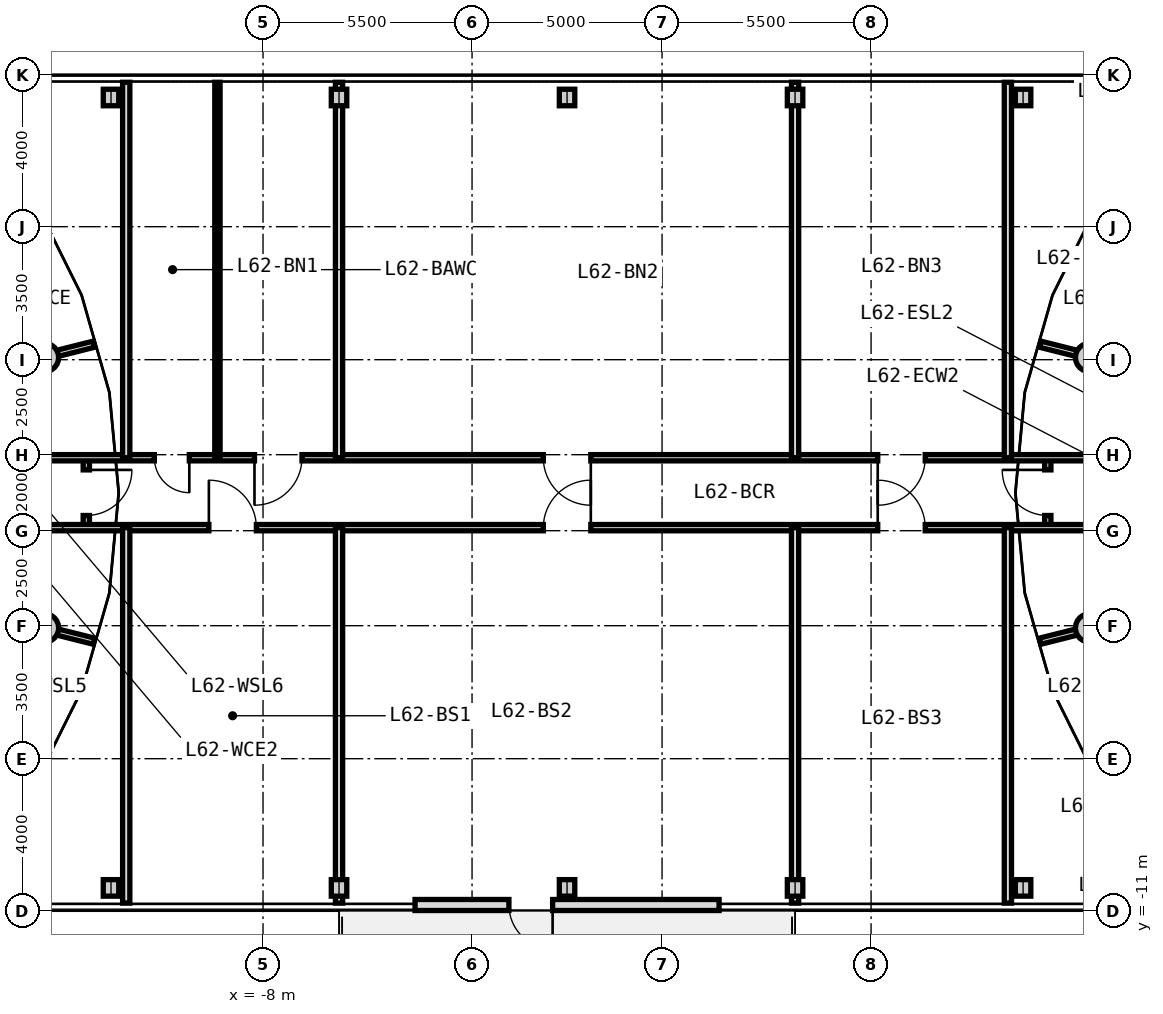
"""IFC4 building model, lengths in metres.
Left out: names, types, materials, properties, quantities, classifications, styles, units other than length and angle.
Written with IfcOpenShell. Run it as: python <this file> out.ifc"""

import sys

from ifc_helpers import new_model, si_unit, direction, frame, frame_2d, origin, origin_2d, place, context, subcontext, project, spatial, rectangle, circle, i_section, extrude, source, transform, mapped, element, fill, save


model = new_model("IFC4")
c1 = context("Model", 3, precision=1e-05, world=origin(), true_north=direction((0.0, 1.0)))
c2 = subcontext(c1, "Body", "Model", "MODEL_VIEW")
j1 = project(units=[si_unit("LENGTHUNIT", "METRE"), si_unit("PLANEANGLEUNIT", "RADIAN")], contexts=[c1])
p1 = place(None, origin())
s1 = spatial("IfcSite", under=j1, at=p1, CompositionType="ELEMENT")
p2 = place(p1, origin())
s2 = spatial("IfcBuilding", under=s1, at=p2, CompositionType="ELEMENT")
p3 = place(p2, frame((0.0, 0.0, 199.8)))
s3 = spatial("IfcBuildingStorey", under=s2, at=p3, CompositionType="ELEMENT", Elevation=199.8)
m1 = source(origin(), c2, "Body", "SweptSolid", [
    extrude(circle(Radius=0.375, at=origin_2d()), origin(), (0.0, 0.0, 1.0), 4.0),
])
for number, where, z_axis, x_axis in (
    (1, (-13.753, 3.559, 0.0), (0.0, 0.0, 1.0), (1.0, 0.0, 0.0)),
    (2, (-13.753, -3.559, 0.0), (0.0, 0.0, 1.0), (1.0, 0.0, 0.0)),
    (3, (13.753, 3.559, 0.0), (0.0, 0.0, 1.0), (1.0, 0.0, 0.0)),
    (4, (13.753, -3.559, 0.0), (0.0, 0.0, 1.0), (1.0, 0.0, 0.0)),
):
    element("IfcColumn", number, at=place(p3, frame(where, z_axis=z_axis, x_axis=x_axis)), inside=s3, PredefinedType="COLUMN", context=c2, shape_type="MappedRepresentation", body=[
        mapped(m1, transform((0.0, 0.0, 0.0), x_axis=(1.0, 0.0, 0.0), y_axis=(0.0, 1.0, 0.0), z_axis=(0.0, 0.0, 1.0), scale=1.0)),
    ])
m2 = source(origin(), c2, "Body", "SweptSolid", [
    extrude(i_section(OverallWidth=0.407, OverallDepth=0.435, WebThickness=0.024, FlangeThickness=0.039, FilletRadius=0.015, at=origin_2d()), origin(), (0.0, 0.0, 1.0), 4.42),
])
for number, where, z_axis, x_axis in (
    (5, (-12.0, -10.4, -0.42), (0.0, 0.0, 1.0), (1.0, 0.0, 0.0)),
    (6, (-12.0, 10.4, -0.42), (0.0, 0.0, 1.0), (1.0, 0.0, 0.0)),
    (7, (-6.0, -10.4, -0.42), (0.0, 0.0, 1.0), (1.0, 0.0, 0.0)),
    (8, (-6.0, 10.4, -0.42), (0.0, 0.0, 1.0), (1.0, 0.0, 0.0)),
    (9, (0.0, -10.4, -0.42), (0.0, 0.0, 1.0), (1.0, 0.0, 0.0)),
    (10, (0.0, 10.4, -0.42), (0.0, 0.0, 1.0), (1.0, 0.0, 0.0)),
    (11, (6.0, -10.4, -0.42), (0.0, 0.0, 1.0), (1.0, 0.0, 0.0)),
    (12, (6.0, 10.4, -0.42), (0.0, 0.0, 1.0), (1.0, 0.0, 0.0)),
    (13, (12.0, -10.4, -0.42), (0.0, 0.0, 1.0), (1.0, 0.0, 0.0)),
    (14, (12.0, 10.4, -0.42), (0.0, 0.0, 1.0), (1.0, 0.0, 0.0)),
):
    element("IfcColumn", number, at=place(p3, frame(where, z_axis=z_axis, x_axis=x_axis)), inside=s3, PredefinedType="COLUMN", context=c2, shape_type="MappedRepresentation", body=[
        mapped(m2, transform((0.0, 0.0, 0.0), x_axis=(1.0, 0.0, 0.0), y_axis=(0.0, 1.0, 0.0), z_axis=(0.0, 0.0, 1.0), scale=1.0)),
    ])
m3 = source(origin(), c2, "Body", "SweptSolid", [
    extrude(rectangle(XDim=8.0, YDim=0.29, at=frame_2d((4.0, 0.0))), origin(), (0.0, 0.0, 1.0), 3.71),
])
p4 = place(p3, frame((4.0, -10.85, 0.0), z_axis=(0.0, 0.0, 1.0), x_axis=(-1.0, 0.0, 0.0)))
e15 = element("IfcWall", 15, at=p4, inside=s3, PredefinedType="SOLIDWALL", context=c2, shape_type="MappedRepresentation", body=[
    mapped(m3, transform((0.0, 0.0, 0.0), x_axis=(1.0, 0.0, 0.0), y_axis=(0.0, 1.0, 0.0), z_axis=(0.0, 0.0, 1.0), scale=1.0)),
])
p5 = place(p4, frame((4.38, 0.0, 0.0)))
e16 = element("IfcOpeningElement", 16, at=p5, cuts=e15, PredefinedType="OPENING", context=c2, shape_type="SweptSolid", body=[
    extrude(rectangle(XDim=1.15, YDim=2.25, at=frame_2d((0.575, 1.125))), frame((0.0, 0.155, 0.0), z_axis=(0.0, -1.0, 0.0), x_axis=(1.0, 0.0, 0.0)), (0.0, 0.0, 1.0), 0.31),
])
m4 = source(origin(), c2, "Body", "SweptSolid", [
    extrude(rectangle(XDim=6.157, YDim=0.165, at=frame_2d((3.079, 0.0))), origin(), (0.0, 0.0, 1.0), 3.295),
])
for number, where, z_axis, x_axis in (
    (17, (-18.42, -2.407, 0.0), (0.0, 0.0, 1.0), (0.97, -0.244, 0.0)),
    (18, (-18.42, 2.407, 0.0), (0.0, 0.0, 1.0), (0.97, 0.244, 0.0)),
    (19, (18.42, 2.407, 0.0), (0.0, 0.0, 1.0), (-0.97, 0.244, 0.0)),
    (20, (18.42, -2.407, 0.0), (0.0, 0.0, 1.0), (-0.97, -0.244, 0.0)),
):
    element("IfcWall", number, at=place(p3, frame(where, z_axis=z_axis, x_axis=x_axis)), inside=s3, PredefinedType="PARTITIONING", context=c2, shape_type="MappedRepresentation", body=[
        mapped(m4, transform((0.0, 0.0, 0.0), x_axis=(1.0, 0.0, 0.0), y_axis=(0.0, 1.0, 0.0), z_axis=(0.0, 0.0, 1.0), scale=1.0)),
    ])
m5 = source(origin(), c2, "Body", "SweptSolid", [
    extrude(rectangle(XDim=1.84, YDim=0.165, at=frame_2d((0.92, 0.0))), origin(), (0.0, 0.0, 1.0), 3.695),
])
p6 = place(p3, frame((-12.65, -0.92, 0.0), z_axis=(0.0, 0.0, 1.0), x_axis=(0.0, 1.0, 0.0)))
e21 = element("IfcWall", 21, at=p6, inside=s3, PredefinedType="PARTITIONING", context=c2, shape_type="MappedRepresentation", body=[
    mapped(m5, transform((0.0, 0.0, 0.0), x_axis=(1.0, 0.0, 0.0), y_axis=(0.0, 1.0, 0.0), z_axis=(0.0, 0.0, 1.0), scale=1.0)),
])
p7 = place(p6, frame((0.32, 0.0, 0.0)))
e22 = element("IfcOpeningElement", 22, at=p7, cuts=e21, PredefinedType="OPENING", context=c2, shape_type="SweptSolid", body=[
    extrude(rectangle(XDim=1.2, YDim=2.15, at=frame_2d((0.6, 1.075))), frame((0.0, 0.093, 0.0), z_axis=(0.0, -1.0, 0.0), x_axis=(1.0, 0.0, 0.0)), (0.0, 0.0, 1.0), 0.185),
])
p8 = place(p3, frame((12.65, -0.92, 0.0), z_axis=(0.0, 0.0, 1.0), x_axis=(0.0, 1.0, 0.0)))
e23 = element("IfcWall", 23, at=p8, inside=s3, PredefinedType="PARTITIONING", context=c2, shape_type="MappedRepresentation", body=[
    mapped(m5, transform((0.0, 0.0, 0.0), x_axis=(1.0, 0.0, 0.0), y_axis=(0.0, 1.0, 0.0), z_axis=(0.0, 0.0, 1.0), scale=1.0)),
])
p9 = place(p8, frame((0.32, 0.0, 0.0)))
e24 = element("IfcOpeningElement", 24, at=p9, cuts=e23, PredefinedType="OPENING", context=c2, shape_type="SweptSolid", body=[
    extrude(rectangle(XDim=1.2, YDim=2.15, at=frame_2d((0.6, 1.075))), frame((0.0, 0.093, 0.0), z_axis=(0.0, -1.0, 0.0), x_axis=(1.0, 0.0, 0.0)), (0.0, 0.0, 1.0), 0.185),
])
m6 = source(origin(), c2, "Body", "SweptSolid", [
    extrude(rectangle(XDim=37.0, YDim=0.165, at=frame_2d((18.5, 0.0))), origin(), (0.0, 0.0, 1.0), 3.695),
])
p10 = place(p3, frame((-18.5, -0.92, 0.0), z_axis=(0.0, 0.0, 1.0), x_axis=(1.0, 0.0, 0.0)))
e25 = element("IfcWall", 25, at=p10, inside=s3, PredefinedType="PARTITIONING", context=c2, shape_type="MappedRepresentation", body=[
    mapped(m6, transform((0.0, 0.0, 0.0), x_axis=(1.0, 0.0, 0.0), y_axis=(0.0, 1.0, 0.0), z_axis=(0.0, 0.0, 1.0), scale=1.0)),
])
p11 = place(p10, frame((2.662, 0.0, 0.0)))
e26 = element("IfcOpeningElement", 26, at=p11, cuts=e25, PredefinedType="OPENING", context=c2, shape_type="SweptSolid", body=[
    extrude(rectangle(XDim=0.95, YDim=2.1, at=frame_2d((0.475, 1.05))), frame((0.0, 0.093, 0.0), z_axis=(0.0, -1.0, 0.0), x_axis=(1.0, 0.0, 0.0)), (0.0, 0.0, 1.0), 0.185),
])
p12 = place(p10, frame((33.388, 0.0, 0.0)))
e27 = element("IfcOpeningElement", 27, at=p12, cuts=e25, PredefinedType="OPENING", context=c2, shape_type="SweptSolid", body=[
    extrude(rectangle(XDim=0.95, YDim=2.1, at=frame_2d((0.475, 1.05))), frame((0.0, 0.093, 0.0), z_axis=(0.0, -1.0, 0.0), x_axis=(1.0, 0.0, 0.0)), (0.0, 0.0, 1.0), 0.185),
])
p13 = place(p10, frame((9.075, 0.0, 0.0)))
e28 = element("IfcOpeningElement", 28, at=p13, cuts=e25, PredefinedType="OPENING", context=c2, shape_type="SweptSolid", body=[
    extrude(rectangle(XDim=1.25, YDim=2.2, at=frame_2d((0.625, 1.1))), frame((0.0, 0.093, 0.0), z_axis=(0.0, -1.0, 0.0), x_axis=(1.0, 0.0, 0.0)), (0.0, 0.0, 1.0), 0.185),
])
p14 = place(p10, frame((17.875, 0.0, 0.0)))
e29 = element("IfcOpeningElement", 29, at=p14, cuts=e25, PredefinedType="OPENING", context=c2, shape_type="SweptSolid", body=[
    extrude(rectangle(XDim=1.25, YDim=2.2, at=frame_2d((0.625, 1.1))), frame((0.0, 0.093, 0.0), z_axis=(0.0, -1.0, 0.0), x_axis=(1.0, 0.0, 0.0)), (0.0, 0.0, 1.0), 0.185),
])
p15 = place(p10, frame((26.675, 0.0, 0.0)))
e30 = element("IfcOpeningElement", 30, at=p15, cuts=e25, PredefinedType="OPENING", context=c2, shape_type="SweptSolid", body=[
    extrude(rectangle(XDim=1.25, YDim=2.2, at=frame_2d((0.625, 1.1))), frame((0.0, 0.093, 0.0), z_axis=(0.0, -1.0, 0.0), x_axis=(1.0, 0.0, 0.0)), (0.0, 0.0, 1.0), 0.185),
])
p16 = place(p3, frame((-18.5, 0.92, 0.0), z_axis=(0.0, 0.0, 1.0), x_axis=(1.0, 0.0, 0.0)))
e31 = element("IfcWall", 31, at=p16, inside=s3, PredefinedType="PARTITIONING", context=c2, shape_type="MappedRepresentation", body=[
    mapped(m6, transform((0.0, 0.0, 0.0), x_axis=(1.0, 0.0, 0.0), y_axis=(0.0, 1.0, 0.0), z_axis=(0.0, 0.0, 1.0), scale=1.0)),
])
p17 = place(p16, frame((2.662, 0.0, 0.0)))
e32 = element("IfcOpeningElement", 32, at=p17, cuts=e31, PredefinedType="OPENING", context=c2, shape_type="SweptSolid", body=[
    extrude(rectangle(XDim=0.95, YDim=2.1, at=frame_2d((0.475, 1.05))), frame((0.0, 0.093, 0.0), z_axis=(0.0, -1.0, 0.0), x_axis=(1.0, 0.0, 0.0)), (0.0, 0.0, 1.0), 0.185),
])
p18 = place(p16, frame((33.388, 0.0, 0.0)))
e33 = element("IfcOpeningElement", 33, at=p18, cuts=e31, PredefinedType="OPENING", context=c2, shape_type="SweptSolid", body=[
    extrude(rectangle(XDim=0.95, YDim=2.1, at=frame_2d((0.475, 1.05))), frame((0.0, 0.093, 0.0), z_axis=(0.0, -1.0, 0.0), x_axis=(1.0, 0.0, 0.0)), (0.0, 0.0, 1.0), 0.185),
])
p19 = place(p16, frame((7.64, 0.0, 0.0)))
e34 = element("IfcOpeningElement", 34, at=p19, cuts=e31, PredefinedType="OPENING", context=c2, shape_type="SweptSolid", body=[
    extrude(rectangle(XDim=0.92, YDim=2.1, at=frame_2d((0.46, 1.05))), frame((0.0, 0.093, 0.0), z_axis=(0.0, -1.0, 0.0), x_axis=(1.0, 0.0, 0.0)), (0.0, 0.0, 1.0), 0.185),
])
p20 = place(p16, frame((10.275, 0.0, 0.0)))
e35 = element("IfcOpeningElement", 35, at=p20, cuts=e31, PredefinedType="OPENING", context=c2, shape_type="SweptSolid", body=[
    extrude(rectangle(XDim=1.25, YDim=2.2, at=frame_2d((0.625, 1.1))), frame((0.0, 0.093, 0.0), z_axis=(0.0, -1.0, 0.0), x_axis=(1.0, 0.0, 0.0)), (0.0, 0.0, 1.0), 0.185),
])
p21 = place(p16, frame((17.875, 0.0, 0.0)))
e36 = element("IfcOpeningElement", 36, at=p21, cuts=e31, PredefinedType="OPENING", context=c2, shape_type="SweptSolid", body=[
    extrude(rectangle(XDim=1.25, YDim=2.2, at=frame_2d((0.625, 1.1))), frame((0.0, 0.093, 0.0), z_axis=(0.0, -1.0, 0.0), x_axis=(1.0, 0.0, 0.0)), (0.0, 0.0, 1.0), 0.185),
])
p22 = place(p16, frame((26.675, 0.0, 0.0)))
e37 = element("IfcOpeningElement", 37, at=p22, cuts=e31, PredefinedType="OPENING", context=c2, shape_type="SweptSolid", body=[
    extrude(rectangle(XDim=1.25, YDim=2.2, at=frame_2d((0.625, 1.1))), frame((0.0, 0.093, 0.0), z_axis=(0.0, -1.0, 0.0), x_axis=(1.0, 0.0, 0.0)), (0.0, 0.0, 1.0), 0.185),
])
m7 = source(origin(), c2, "Body", "SweptSolid", [
    extrude(rectangle(XDim=9.88, YDim=0.19, at=frame_2d((4.94, 0.0))), origin(), (0.0, 0.0, 1.0), 3.695),
])
for number, where, z_axis, x_axis in (
    (38, (-11.6, -10.8, 0.0), (0.0, 0.0, 1.0), (0.0, 1.0, 0.0)),
    (39, (-11.6, 0.92, 0.0), (0.0, 0.0, 1.0), (0.0, 1.0, 0.0)),
    (40, (11.6, -10.8, 0.0), (0.0, 0.0, 1.0), (0.0, 1.0, 0.0)),
    (41, (11.6, 0.92, 0.0), (0.0, 0.0, 1.0), (0.0, 1.0, 0.0)),
):
    element("IfcWall", number, at=place(p3, frame(where, z_axis=z_axis, x_axis=x_axis)), inside=s3, PredefinedType="PARTITIONING", context=c2, shape_type="MappedRepresentation", body=[
        mapped(m7, transform((0.0, 0.0, 0.0), x_axis=(1.0, 0.0, 0.0), y_axis=(0.0, 1.0, 0.0), z_axis=(0.0, 0.0, 1.0), scale=1.0)),
    ])
m8 = source(origin(), c2, "Body", "SweptSolid", [
    extrude(rectangle(XDim=9.88, YDim=0.19, at=frame_2d((4.94, 0.0))), origin(), (0.0, 0.0, 1.0), 2.995),
])
for number, where, z_axis, x_axis in (
    (42, (-6.0, -10.8, 0.0), (0.0, 0.0, 1.0), (0.0, 1.0, 0.0)),
    (43, (-6.0, 0.92, 0.0), (0.0, 0.0, 1.0), (0.0, 1.0, 0.0)),
):
    element("IfcWall", number, at=place(p3, frame(where, z_axis=z_axis, x_axis=x_axis)), inside=s3, PredefinedType="PARTITIONING", context=c2, shape_type="MappedRepresentation", body=[
        mapped(m8, transform((0.0, 0.0, 0.0), x_axis=(1.0, 0.0, 0.0), y_axis=(0.0, 1.0, 0.0), z_axis=(0.0, 0.0, 1.0), scale=1.0)),
    ])
m9 = source(origin(), c2, "Body", "SweptSolid", [
    extrude(rectangle(XDim=9.88, YDim=0.14, at=frame_2d((4.94, 0.0))), origin(), (0.0, 0.0, 1.0), 3.695),
])
p23 = place(p3, frame((-9.2, 0.92, 0.0), z_axis=(0.0, 0.0, 1.0), x_axis=(0.0, 1.0, 0.0)))
e44 = element("IfcWall", 44, at=p23, inside=s3, PredefinedType="PARTITIONING", context=c2, shape_type="MappedRepresentation", body=[
    mapped(m9, transform((0.0, 0.0, 0.0), x_axis=(1.0, 0.0, 0.0), y_axis=(0.0, 1.0, 0.0), z_axis=(0.0, 0.0, 1.0), scale=1.0)),
])
for number, where, z_axis, x_axis in (
    (45, (6.0, -10.8, 0.0), (0.0, 0.0, 1.0), (0.0, 1.0, 0.0)),
    (46, (6.0, 0.92, 0.0), (0.0, 0.0, 1.0), (0.0, 1.0, 0.0)),
):
    element("IfcWall", number, at=place(p3, frame(where, z_axis=z_axis, x_axis=x_axis)), inside=s3, PredefinedType="PARTITIONING", context=c2, shape_type="MappedRepresentation", body=[
        mapped(m8, transform((0.0, 0.0, 0.0), x_axis=(1.0, 0.0, 0.0), y_axis=(0.0, 1.0, 0.0), z_axis=(0.0, 0.0, 1.0), scale=1.0)),
    ])
m10 = source(origin(), c2, "Body", "SweptSolid", [
    extrude(rectangle(XDim=1.15, YDim=2.25, at=frame_2d((0.575, 1.125))), frame((0.0, 0.025, 0.0), z_axis=(0.0, -1.0, 0.0), x_axis=(1.0, 0.0, 0.0)), (0.0, 0.0, 1.0), 0.05),
])
p24 = place(p5, origin())
e47 = element("IfcDoor", 47, at=p24, inside=s3, OperationType="SINGLE_SWING_LEFT", PredefinedType="DOOR", context=c2, shape_type="MappedRepresentation", body=[
    mapped(m10, transform((0.0, 0.0, 0.0), x_axis=(1.0, 0.0, 0.0), y_axis=(0.0, 1.0, 0.0), z_axis=(0.0, 0.0, 1.0), scale=1.0)),
])
fill(e16, e47)
m11 = source(origin(), c2, "Body", "SweptSolid", [
    extrude(rectangle(XDim=1.2, YDim=2.15, at=frame_2d((0.6, 1.075))), frame((0.0, 0.025, 0.0), z_axis=(0.0, -1.0, 0.0), x_axis=(1.0, 0.0, 0.0)), (0.0, 0.0, 1.0), 0.05),
])
p25 = place(p7, frame((1.2, 0.0, 0.0), z_axis=(0.0, 0.0, 1.0), x_axis=(-1.0, 0.0, 0.0)))
e48 = element("IfcDoor", 48, at=p25, inside=s3, OperationType="SINGLE_SWING_LEFT", PredefinedType="DOOR", context=c2, shape_type="MappedRepresentation", body=[
    mapped(m11, transform((0.0, 0.0, 0.0), x_axis=(1.0, 0.0, 0.0), y_axis=(0.0, 1.0, 0.0), z_axis=(0.0, 0.0, 1.0), scale=1.0)),
])
fill(e22, e48)
p26 = place(p9, origin())
e49 = element("IfcDoor", 49, at=p26, inside=s3, OperationType="SINGLE_SWING_RIGHT", PredefinedType="DOOR", context=c2, shape_type="MappedRepresentation", body=[
    mapped(m11, transform((0.0, 0.0, 0.0), x_axis=(1.0, 0.0, 0.0), y_axis=(0.0, 1.0, 0.0), z_axis=(0.0, 0.0, 1.0), scale=1.0)),
])
fill(e24, e49)
m12 = source(origin(), c2, "Body", "SweptSolid", [
    extrude(rectangle(XDim=1.25, YDim=2.2, at=frame_2d((0.625, 1.1))), frame((0.0, 0.025, 0.0), z_axis=(0.0, -1.0, 0.0), x_axis=(1.0, 0.0, 0.0)), (0.0, 0.0, 1.0), 0.05),
])
p27 = place(p13, origin())
e50 = element("IfcDoor", 50, at=p27, inside=s3, OperationType="SINGLE_SWING_LEFT", PredefinedType="DOOR", context=c2, shape_type="MappedRepresentation", body=[
    mapped(m12, transform((0.0, 0.0, 0.0), x_axis=(1.0, 0.0, 0.0), y_axis=(0.0, 1.0, 0.0), z_axis=(0.0, 0.0, 1.0), scale=1.0)),
])
fill(e28, e50)
m13 = source(origin(), c2, "Body", "SweptSolid", [
    extrude(rectangle(XDim=0.92, YDim=2.1, at=frame_2d((0.46, 1.05))), frame((0.0, 0.025, 0.0), z_axis=(0.0, -1.0, 0.0), x_axis=(1.0, 0.0, 0.0)), (0.0, 0.0, 1.0), 0.05),
])
p28 = place(p19, frame((0.92, 0.0, 0.0), z_axis=(0.0, 0.0, 1.0), x_axis=(-1.0, 0.0, 0.0)))
e51 = element("IfcDoor", 51, at=p28, inside=s3, OperationType="SINGLE_SWING_LEFT", PredefinedType="DOOR", context=c2, shape_type="MappedRepresentation", body=[
    mapped(m13, transform((0.0, 0.0, 0.0), x_axis=(1.0, 0.0, 0.0), y_axis=(0.0, 1.0, 0.0), z_axis=(0.0, 0.0, 1.0), scale=1.0)),
])
fill(e34, e51)
p29 = place(p20, frame((1.25, 0.0, 0.0), z_axis=(0.0, 0.0, 1.0), x_axis=(-1.0, 0.0, 0.0)))
e52 = element("IfcDoor", 52, at=p29, inside=s3, OperationType="SINGLE_SWING_RIGHT", PredefinedType="DOOR", context=c2, shape_type="MappedRepresentation", body=[
    mapped(m12, transform((0.0, 0.0, 0.0), x_axis=(1.0, 0.0, 0.0), y_axis=(0.0, 1.0, 0.0), z_axis=(0.0, 0.0, 1.0), scale=1.0)),
])
fill(e35, e52)
p30 = place(p14, origin())
e53 = element("IfcDoor", 53, at=p30, inside=s3, OperationType="SINGLE_SWING_RIGHT", PredefinedType="DOOR", context=c2, shape_type="MappedRepresentation", body=[
    mapped(m12, transform((0.0, 0.0, 0.0), x_axis=(1.0, 0.0, 0.0), y_axis=(0.0, 1.0, 0.0), z_axis=(0.0, 0.0, 1.0), scale=1.0)),
])
fill(e29, e53)
p31 = place(p21, frame((1.25, 0.0, 0.0), z_axis=(0.0, 0.0, 1.0), x_axis=(-1.0, 0.0, 0.0)))
e54 = element("IfcDoor", 54, at=p31, inside=s3, OperationType="SINGLE_SWING_LEFT", PredefinedType="DOOR", context=c2, shape_type="MappedRepresentation", body=[
    mapped(m12, transform((0.0, 0.0, 0.0), x_axis=(1.0, 0.0, 0.0), y_axis=(0.0, 1.0, 0.0), z_axis=(0.0, 0.0, 1.0), scale=1.0)),
])
fill(e36, e54)
p32 = place(p15, origin())
e55 = element("IfcDoor", 55, at=p32, inside=s3, OperationType="SINGLE_SWING_LEFT", PredefinedType="DOOR", context=c2, shape_type="MappedRepresentation", body=[
    mapped(m12, transform((0.0, 0.0, 0.0), x_axis=(1.0, 0.0, 0.0), y_axis=(0.0, 1.0, 0.0), z_axis=(0.0, 0.0, 1.0), scale=1.0)),
])
fill(e30, e55)
p33 = place(p22, frame((1.25, 0.0, 0.0), z_axis=(0.0, 0.0, 1.0), x_axis=(-1.0, 0.0, 0.0)))
e56 = element("IfcDoor", 56, at=p33, inside=s3, OperationType="SINGLE_SWING_RIGHT", PredefinedType="DOOR", context=c2, shape_type="MappedRepresentation", body=[
    mapped(m12, transform((0.0, 0.0, 0.0), x_axis=(1.0, 0.0, 0.0), y_axis=(0.0, 1.0, 0.0), z_axis=(0.0, 0.0, 1.0), scale=1.0)),
])
fill(e37, e56)
save(model, sys.argv[1])
